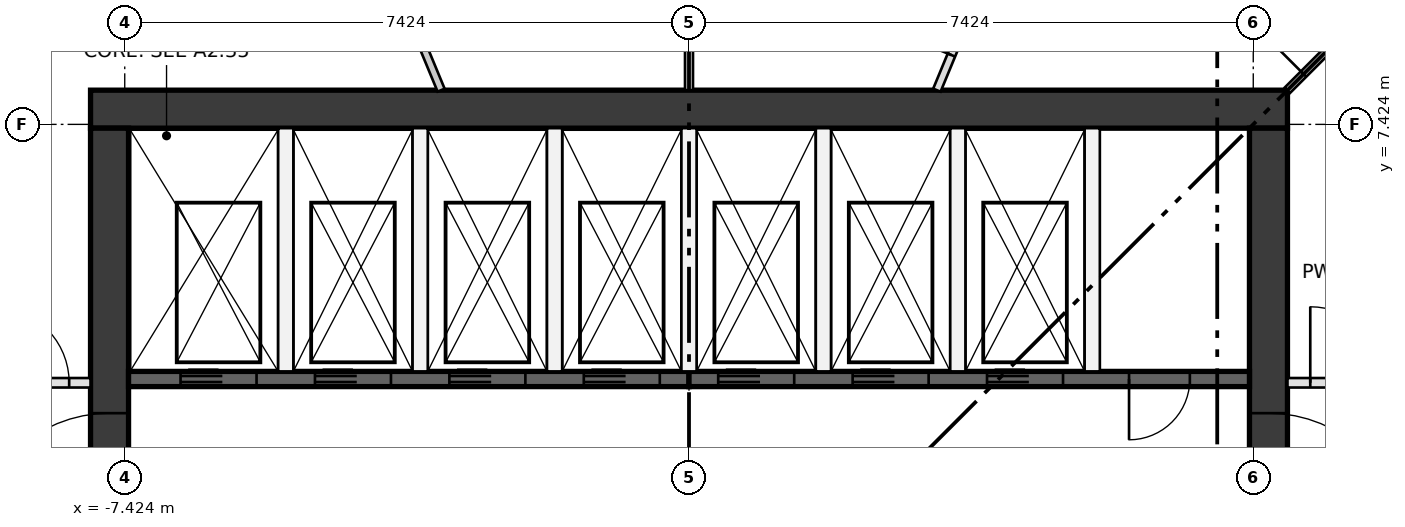
"""IFC4 building model, lengths in metres.
Left out: names, types, materials, properties, quantities, classifications, styles, units other than length and angle.
Written with IfcOpenShell. Run it as: python <this file> out.ifc"""

import sys

from ifc_helpers import new_model, si_unit, direction, frame, frame_2d, origin, place, context, subcontext, project, spatial, rectangle, extrude, element, fill, save


model = new_model("IFC4")
c1 = context("Model", 3, precision=1e-05, world=origin(), true_north=direction((0.0, 1.0)))
c2 = subcontext(c1, "Body", "Model", "MODEL_VIEW")
j1 = project(units=[si_unit("LENGTHUNIT", "METRE"), si_unit("PLANEANGLEUNIT", "RADIAN")], contexts=[c1])
p1 = place(None, origin())
s1 = spatial("IfcSite", under=j1, at=p1, CompositionType="ELEMENT")
p2 = place(p1, origin())
s2 = spatial("IfcBuilding", under=s1, at=p2, CompositionType="ELEMENT")
p3 = place(p2, frame((0.0, 0.0, 214.45)))
s3 = spatial("IfcBuildingStorey", under=s2, at=p3, CompositionType="ELEMENT", Elevation=214.45)
p4 = place(p3, frame((-7.874, 7.624, 0.0), z_axis=(0.0, 0.0, 1.0), x_axis=(1.0, 0.0, 0.0)))
e1 = element("IfcWall", 1, at=p4, inside=s3, PredefinedType="SHEAR", context=c2, shape_type="SweptSolid", body=[
    extrude(rectangle(XDim=15.748, YDim=0.5, at=frame_2d((7.874, 0.0))), origin(), (0.0, 0.0, 1.0), 3.35),
])
p5 = place(p3, frame((-7.624, -7.374, 0.0), z_axis=(0.0, 0.0, 1.0), x_axis=(0.0, 1.0, 0.0)))
e2 = element("IfcWall", 2, at=p5, inside=s3, PredefinedType="SHEAR", context=c2, shape_type="SweptSolid", body=[
    extrude(rectangle(XDim=14.748, YDim=0.5, at=frame_2d((7.374, 0.0))), origin(), (0.0, 0.0, 1.0), 3.35),
])
p6 = place(p5, frame((6.874, 0.0, 0.0)))
e3 = element("IfcOpeningElement", 3, at=p6, cuts=e2, PredefinedType="OPENING", context=c2, shape_type="SweptSolid", body=[
    extrude(rectangle(XDim=1.0, YDim=2.1, at=frame_2d((0.5, 1.05))), frame((0.0, 0.26, 0.0), z_axis=(0.0, -1.0, 0.0), x_axis=(1.0, 0.0, 0.0)), (0.0, 0.0, 1.0), 0.52),
])
p7 = place(p5, frame((3.75, 0.0, 0.0)))
e4 = element("IfcOpeningElement", 4, at=p7, cuts=e2, PredefinedType="OPENING", context=c2, shape_type="SweptSolid", body=[
    extrude(rectangle(XDim=1.8, YDim=2.1, at=frame_2d((0.9, 1.05))), frame((0.0, 0.26, 0.0), z_axis=(0.0, -1.0, 0.0), x_axis=(1.0, 0.0, 0.0)), (0.0, 0.0, 1.0), 0.52),
])
p8 = place(p5, frame((9.198, 0.0, 0.0)))
e5 = element("IfcOpeningElement", 5, at=p8, cuts=e2, PredefinedType="OPENING", context=c2, shape_type="SweptSolid", body=[
    extrude(rectangle(XDim=1.8, YDim=2.1, at=frame_2d((0.9, 1.05))), frame((0.0, 0.26, 0.0), z_axis=(0.0, -1.0, 0.0), x_axis=(1.0, 0.0, 0.0)), (0.0, 0.0, 1.0), 0.52),
])
p9 = place(p3, frame((7.624, -7.374, 0.0), z_axis=(0.0, 0.0, 1.0), x_axis=(0.0, 1.0, 0.0)))
e6 = element("IfcWall", 6, at=p9, inside=s3, PredefinedType="SHEAR", context=c2, shape_type="SweptSolid", body=[
    extrude(rectangle(XDim=14.748, YDim=0.5, at=frame_2d((7.374, 0.0))), origin(), (0.0, 0.0, 1.0), 3.35),
])
p10 = place(p9, frame((6.874, 0.0, 0.0)))
e7 = element("IfcOpeningElement", 7, at=p10, cuts=e6, PredefinedType="OPENING", context=c2, shape_type="SweptSolid", body=[
    extrude(rectangle(XDim=1.0, YDim=2.1, at=frame_2d((0.5, 1.05))), frame((0.0, 0.26, 0.0), z_axis=(0.0, -1.0, 0.0), x_axis=(1.0, 0.0, 0.0)), (0.0, 0.0, 1.0), 0.52),
])
p11 = place(p9, frame((3.75, 0.0, 0.0)))
e8 = element("IfcOpeningElement", 8, at=p11, cuts=e6, PredefinedType="OPENING", context=c2, shape_type="SweptSolid", body=[
    extrude(rectangle(XDim=1.8, YDim=2.1, at=frame_2d((0.9, 1.05))), frame((0.0, 0.26, 0.0), z_axis=(0.0, -1.0, 0.0), x_axis=(1.0, 0.0, 0.0)), (0.0, 0.0, 1.0), 0.52),
])
p12 = place(p9, frame((9.198, 0.0, 0.0)))
e9 = element("IfcOpeningElement", 9, at=p12, cuts=e6, PredefinedType="OPENING", context=c2, shape_type="SweptSolid", body=[
    extrude(rectangle(XDim=1.8, YDim=2.1, at=frame_2d((0.9, 1.05))), frame((0.0, 0.26, 0.0), z_axis=(0.0, -1.0, 0.0), x_axis=(1.0, 0.0, 0.0)), (0.0, 0.0, 1.0), 0.52),
])
p13 = place(p3, frame((-7.374, 4.074, 0.0), z_axis=(0.0, 0.0, 1.0), x_axis=(1.0, 0.0, 0.0)))
e10 = element("IfcWall", 10, at=p13, inside=s3, PredefinedType="SHEAR", context=c2, shape_type="SweptSolid", body=[
    extrude(rectangle(XDim=7.374, YDim=0.2, at=frame_2d((3.687, 0.0))), origin(), (0.0, 0.0, 1.0), 3.0),
])
p14 = place(p13, frame((0.684, 0.0, 0.0)))
e11 = element("IfcOpeningElement", 11, at=p14, cuts=e10, PredefinedType="OPENING", context=c2, shape_type="SweptSolid", body=[
    extrude(rectangle(XDim=1.0, YDim=2.1, at=frame_2d((0.5, 1.05))), frame((0.0, 0.11, 0.0), z_axis=(0.0, -1.0, 0.0), x_axis=(1.0, 0.0, 0.0)), (0.0, 0.0, 1.0), 0.22),
])
p15 = place(p13, frame((2.453, 0.0, 0.0)))
e12 = element("IfcOpeningElement", 12, at=p15, cuts=e10, PredefinedType="OPENING", context=c2, shape_type="SweptSolid", body=[
    extrude(rectangle(XDim=1.0, YDim=2.1, at=frame_2d((0.5, 1.05))), frame((0.0, 0.11, 0.0), z_axis=(0.0, -1.0, 0.0), x_axis=(1.0, 0.0, 0.0)), (0.0, 0.0, 1.0), 0.22),
])
p16 = place(p13, frame((4.221, 0.0, 0.0)))
e13 = element("IfcOpeningElement", 13, at=p16, cuts=e10, PredefinedType="OPENING", context=c2, shape_type="SweptSolid", body=[
    extrude(rectangle(XDim=1.0, YDim=2.1, at=frame_2d((0.5, 1.05))), frame((0.0, 0.11, 0.0), z_axis=(0.0, -1.0, 0.0), x_axis=(1.0, 0.0, 0.0)), (0.0, 0.0, 1.0), 0.22),
])
p17 = place(p13, frame((5.99, 0.0, 0.0)))
e14 = element("IfcOpeningElement", 14, at=p17, cuts=e10, PredefinedType="OPENING", context=c2, shape_type="SweptSolid", body=[
    extrude(rectangle(XDim=1.0, YDim=2.1, at=frame_2d((0.5, 1.05))), frame((0.0, 0.11, 0.0), z_axis=(0.0, -1.0, 0.0), x_axis=(1.0, 0.0, 0.0)), (0.0, 0.0, 1.0), 0.22),
])
p18 = place(p3, frame((0.0, 4.074, 0.0), z_axis=(0.0, 0.0, 1.0), x_axis=(1.0, 0.0, 0.0)))
e15 = element("IfcWall", 15, at=p18, inside=s3, PredefinedType="SHEAR", context=c2, shape_type="SweptSolid", body=[
    extrude(rectangle(XDim=7.374, YDim=0.2, at=frame_2d((3.687, 0.0))), origin(), (0.0, 0.0, 1.0), 3.0),
])
p19 = place(p18, frame((0.384, 0.0, 0.0)))
e16 = element("IfcOpeningElement", 16, at=p19, cuts=e15, PredefinedType="OPENING", context=c2, shape_type="SweptSolid", body=[
    extrude(rectangle(XDim=1.0, YDim=2.1, at=frame_2d((0.5, 1.05))), frame((0.0, 0.11, 0.0), z_axis=(0.0, -1.0, 0.0), x_axis=(1.0, 0.0, 0.0)), (0.0, 0.0, 1.0), 0.22),
])
p20 = place(p18, frame((2.153, 0.0, 0.0)))
e17 = element("IfcOpeningElement", 17, at=p20, cuts=e15, PredefinedType="OPENING", context=c2, shape_type="SweptSolid", body=[
    extrude(rectangle(XDim=1.0, YDim=2.1, at=frame_2d((0.5, 1.05))), frame((0.0, 0.11, 0.0), z_axis=(0.0, -1.0, 0.0), x_axis=(1.0, 0.0, 0.0)), (0.0, 0.0, 1.0), 0.22),
])
p21 = place(p18, frame((3.921, 0.0, 0.0)))
e18 = element("IfcOpeningElement", 18, at=p21, cuts=e15, PredefinedType="OPENING", context=c2, shape_type="SweptSolid", body=[
    extrude(rectangle(XDim=1.0, YDim=2.1, at=frame_2d((0.5, 1.05))), frame((0.0, 0.11, 0.0), z_axis=(0.0, -1.0, 0.0), x_axis=(1.0, 0.0, 0.0)), (0.0, 0.0, 1.0), 0.22),
])
p22 = place(p18, frame((5.79, 0.0, 0.0)))
e19 = element("IfcOpeningElement", 19, at=p22, cuts=e15, PredefinedType="OPENING", context=c2, shape_type="SweptSolid", body=[
    extrude(rectangle(XDim=0.8, YDim=2.1, at=frame_2d((0.4, 1.05))), frame((0.0, 0.11, 0.0), z_axis=(0.0, -1.0, 0.0), x_axis=(1.0, 0.0, 0.0)), (0.0, 0.0, 1.0), 0.22),
])
for number, where, z_axis, x_axis in (
    (20, (-5.305, 4.174, 0.0), (0.0, 0.0, 1.0), (0.0, 1.0, 0.0)),
    (21, (-3.537, 4.174, 0.0), (0.0, 0.0, 1.0), (0.0, 1.0, 0.0)),
    (22, (-1.769, 4.174, 0.0), (0.0, 0.0, 1.0), (0.0, 1.0, 0.0)),
    (23, (0.0, 4.174, 0.0), (0.0, 0.0, 1.0), (0.0, 1.0, 0.0)),
    (24, (1.769, 4.174, 0.0), (0.0, 0.0, 1.0), (0.0, 1.0, 0.0)),
    (25, (3.537, 4.174, 0.0), (0.0, 0.0, 1.0), (0.0, 1.0, 0.0)),
    (26, (5.305, 4.174, 0.0), (0.0, 0.0, 1.0), (0.0, 1.0, 0.0)),
):
    element("IfcWall", number, at=place(p3, frame(where, z_axis=z_axis, x_axis=x_axis)), inside=s3, PredefinedType="PARTITIONING", context=c2, shape_type="SweptSolid", body=[
        extrude(rectangle(XDim=3.2, YDim=0.2, at=frame_2d((1.6, 0.0))), origin(), (0.0, 0.0, 1.0), 3.0),
    ])
p23 = place(p3, frame((7.874, 4.024, 0.0), z_axis=(0.0, 0.0, 1.0), x_axis=(1.0, 0.0, 0.0)))
e27 = element("IfcWall", 27, at=p23, inside=s3, PredefinedType="PARTITIONING", context=c2, shape_type="SweptSolid", body=[
    extrude(rectangle(XDim=2.475, YDim=0.125, at=frame_2d((1.238, 0.0))), origin(), (0.0, 0.0, 1.0), 3.0),
])
p24 = place(p23, frame((0.3, 0.0, 0.0)))
e28 = element("IfcOpeningElement", 28, at=p24, cuts=e27, PredefinedType="OPENING", context=c2, shape_type="SweptSolid", body=[
    extrude(rectangle(XDim=1.0, YDim=2.1, at=frame_2d((0.5, 1.05))), frame((0.0, 0.073, 0.0), z_axis=(0.0, -1.0, 0.0), x_axis=(1.0, 0.0, 0.0)), (0.0, 0.0, 1.0), 0.145),
])
p25 = place(p3, frame((-9.436, 4.024, 0.0), z_axis=(0.0, 0.0, 1.0), x_axis=(1.0, 0.0, 0.0)))
e29 = element("IfcWall", 29, at=p25, inside=s3, PredefinedType="PARTITIONING", context=c2, shape_type="SweptSolid", body=[
    extrude(rectangle(XDim=1.562, YDim=0.125, at=frame_2d((0.781, 0.0))), origin(), (0.0, 0.0, 1.0), 3.0),
])
p26 = place(p25, frame((0.281, 0.0, 0.0)))
e30 = element("IfcOpeningElement", 30, at=p26, cuts=e29, PredefinedType="OPENING", context=c2, shape_type="SweptSolid", body=[
    extrude(rectangle(XDim=1.0, YDim=2.1, at=frame_2d((0.5, 1.05))), frame((0.0, 0.073, 0.0), z_axis=(0.0, -1.0, 0.0), x_axis=(1.0, 0.0, 0.0)), (0.0, 0.0, 1.0), 0.145),
])
p27 = place(p3, frame((7.874, 7.874, 0.0), z_axis=(0.0, 0.0, 1.0), x_axis=(0.707106781187, 0.707106781187, 0.0)))
e31 = element("IfcWall", 31, at=p27, inside=s3, PredefinedType="PARTITIONING", context=c2, shape_type="SweptSolid", body=[
    extrude(rectangle(XDim=3.584, YDim=0.1, at=frame_2d((1.792, 0.0))), origin(), (0.0, 0.0, 1.0), 3.0),
])
p28 = place(p27, frame((0.3, 0.0, 0.0)))
e32 = element("IfcOpeningElement", 32, at=p28, cuts=e31, PredefinedType="OPENING", context=c2, shape_type="SweptSolid", body=[
    extrude(rectangle(XDim=1.0, YDim=2.1, at=frame_2d((0.5, 1.05))), frame((0.0, 0.06, 0.0), z_axis=(0.0, -1.0, 0.0), x_axis=(1.0, 0.0, 0.0)), (0.0, 0.0, 1.0), 0.12),
])
p29 = place(p3, frame((3.261, 7.874, 0.0), z_axis=(0.0, 0.0, 1.0), x_axis=(0.382670108955, 0.923885051136, 0.0)))
e33 = element("IfcWall", 33, at=p29, inside=s3, PredefinedType="PARTITIONING", context=c2, shape_type="SweptSolid", body=[
    extrude(rectangle(XDim=2.077, YDim=0.105, at=frame_2d((1.039, 0.0))), origin(), (0.0, 0.0, 1.0), 3.0),
])
p30 = place(p29, frame((0.5, 0.0, 0.0)))
e34 = element("IfcOpeningElement", 34, at=p30, cuts=e33, PredefinedType="OPENING", context=c2, shape_type="SweptSolid", body=[
    extrude(rectangle(XDim=1.0, YDim=2.1, at=frame_2d((0.5, 1.05))), frame((0.0, 0.062, 0.0), z_axis=(0.0, -1.0, 0.0), x_axis=(1.0, 0.0, 0.0)), (0.0, 0.0, 1.0), 0.125),
])
p31 = place(p3, frame((0.0, 7.874, 0.0), z_axis=(0.0, 0.0, 1.0), x_axis=(0.0, 1.0, 0.0)))
e35 = element("IfcWall", 35, at=p31, inside=s3, PredefinedType="PARTITIONING", context=c2, shape_type="SweptSolid", body=[
    extrude(rectangle(XDim=2.726, YDim=0.105, at=frame_2d((1.363, 0.0))), origin(), (0.0, 0.0, 1.0), 3.0),
])
p32 = place(p3, frame((-4.056, 9.793, 0.0), z_axis=(0.0, 0.0, 1.0), x_axis=(0.382670108955, -0.923885051136, 0.0)))
e36 = element("IfcWall", 36, at=p32, inside=s3, PredefinedType="PARTITIONING", context=c2, shape_type="SweptSolid", body=[
    extrude(rectangle(XDim=2.077, YDim=0.1, at=frame_2d((1.039, 0.0))), origin(), (0.0, 0.0, 1.0), 3.0),
])
p33 = place(p32, frame((0.5, 0.0, 0.0)))
e37 = element("IfcOpeningElement", 37, at=p33, cuts=e36, PredefinedType="OPENING", context=c2, shape_type="SweptSolid", body=[
    extrude(rectangle(XDim=1.0, YDim=2.1, at=frame_2d((0.5, 1.05))), frame((0.0, 0.06, 0.0), z_axis=(0.0, -1.0, 0.0), x_axis=(1.0, 0.0, 0.0)), (0.0, 0.0, 1.0), 0.12),
])
p34 = place(p14, frame((1.0, 0.0, 0.0), z_axis=(0.0, 0.0, 1.0), x_axis=(-1.0, 0.0, 0.0)))
e38 = element("IfcDoor", 38, at=p34, inside=s3, OperationType="DOUBLE_DOOR_SLIDING", PredefinedType="DOOR", context=c2, shape_type="SweptSolid", body=[
    extrude(rectangle(XDim=1.0, YDim=2.1, at=frame_2d((0.5, 1.05))), frame((0.0, 0.025, 0.0), z_axis=(0.0, -1.0, 0.0), x_axis=(1.0, 0.0, 0.0)), (0.0, 0.0, 1.0), 0.05),
])
fill(e11, e38)
p35 = place(p15, frame((1.0, 0.0, 0.0), z_axis=(0.0, 0.0, 1.0), x_axis=(-1.0, 0.0, 0.0)))
e39 = element("IfcDoor", 39, at=p35, inside=s3, OperationType="DOUBLE_DOOR_SLIDING", PredefinedType="DOOR", context=c2, shape_type="SweptSolid", body=[
    extrude(rectangle(XDim=1.0, YDim=2.1, at=frame_2d((0.5, 1.05))), frame((0.0, 0.025, 0.0), z_axis=(0.0, -1.0, 0.0), x_axis=(1.0, 0.0, 0.0)), (0.0, 0.0, 1.0), 0.05),
])
fill(e12, e39)
p36 = place(p16, frame((1.0, 0.0, 0.0), z_axis=(0.0, 0.0, 1.0), x_axis=(-1.0, 0.0, 0.0)))
e40 = element("IfcDoor", 40, at=p36, inside=s3, OperationType="DOUBLE_DOOR_SLIDING", PredefinedType="DOOR", context=c2, shape_type="SweptSolid", body=[
    extrude(rectangle(XDim=1.0, YDim=2.1, at=frame_2d((0.5, 1.05))), frame((0.0, 0.025, 0.0), z_axis=(0.0, -1.0, 0.0), x_axis=(1.0, 0.0, 0.0)), (0.0, 0.0, 1.0), 0.05),
])
fill(e13, e40)
p37 = place(p17, frame((1.0, 0.0, 0.0), z_axis=(0.0, 0.0, 1.0), x_axis=(-1.0, 0.0, 0.0)))
e41 = element("IfcDoor", 41, at=p37, inside=s3, OperationType="DOUBLE_DOOR_SLIDING", PredefinedType="DOOR", context=c2, shape_type="SweptSolid", body=[
    extrude(rectangle(XDim=1.0, YDim=2.1, at=frame_2d((0.5, 1.05))), frame((0.0, 0.025, 0.0), z_axis=(0.0, -1.0, 0.0), x_axis=(1.0, 0.0, 0.0)), (0.0, 0.0, 1.0), 0.05),
])
fill(e14, e41)
p38 = place(p19, frame((1.0, 0.0, 0.0), z_axis=(0.0, 0.0, 1.0), x_axis=(-1.0, 0.0, 0.0)))
e42 = element("IfcDoor", 42, at=p38, inside=s3, OperationType="DOUBLE_DOOR_SLIDING", PredefinedType="DOOR", context=c2, shape_type="SweptSolid", body=[
    extrude(rectangle(XDim=1.0, YDim=2.1, at=frame_2d((0.5, 1.05))), frame((0.0, 0.025, 0.0), z_axis=(0.0, -1.0, 0.0), x_axis=(1.0, 0.0, 0.0)), (0.0, 0.0, 1.0), 0.05),
])
fill(e16, e42)
p39 = place(p20, frame((1.0, 0.0, 0.0), z_axis=(0.0, 0.0, 1.0), x_axis=(-1.0, 0.0, 0.0)))
e43 = element("IfcDoor", 43, at=p39, inside=s3, OperationType="DOUBLE_DOOR_SLIDING", PredefinedType="DOOR", context=c2, shape_type="SweptSolid", body=[
    extrude(rectangle(XDim=1.0, YDim=2.1, at=frame_2d((0.5, 1.05))), frame((0.0, 0.025, 0.0), z_axis=(0.0, -1.0, 0.0), x_axis=(1.0, 0.0, 0.0)), (0.0, 0.0, 1.0), 0.05),
])
fill(e17, e43)
p40 = place(p21, frame((1.0, 0.0, 0.0), z_axis=(0.0, 0.0, 1.0), x_axis=(-1.0, 0.0, 0.0)))
e44 = element("IfcDoor", 44, at=p40, inside=s3, OperationType="DOUBLE_DOOR_SLIDING", PredefinedType="DOOR", context=c2, shape_type="SweptSolid", body=[
    extrude(rectangle(XDim=1.0, YDim=2.1, at=frame_2d((0.5, 1.05))), frame((0.0, 0.025, 0.0), z_axis=(0.0, -1.0, 0.0), x_axis=(1.0, 0.0, 0.0)), (0.0, 0.0, 1.0), 0.05),
])
fill(e18, e44)
p41 = place(p22, frame((0.8, 0.0, 0.0), z_axis=(0.0, 0.0, 1.0), x_axis=(-1.0, 0.0, 0.0)))
e45 = element("IfcDoor", 45, at=p41, inside=s3, OperationType="SINGLE_SWING_LEFT", PredefinedType="DOOR", context=c2, shape_type="SweptSolid", body=[
    extrude(rectangle(XDim=0.8, YDim=2.1, at=frame_2d((0.4, 1.05))), frame((0.0, 0.025, 0.0), z_axis=(0.0, -1.0, 0.0), x_axis=(1.0, 0.0, 0.0)), (0.0, 0.0, 1.0), 0.05),
])
fill(e19, e45)
p42 = place(p8, origin())
e46 = element("IfcDoor", 46, at=p42, inside=s3, OperationType="DOUBLE_DOOR_SINGLE_SWING", PredefinedType="DOOR", context=c2, shape_type="SweptSolid", body=[
    extrude(rectangle(XDim=1.8, YDim=2.1, at=frame_2d((0.9, 1.05))), frame((0.0, 0.025, 0.0), z_axis=(0.0, -1.0, 0.0), x_axis=(1.0, 0.0, 0.0)), (0.0, 0.0, 1.0), 0.05),
])
fill(e5, e46)
p43 = place(p12, frame((1.8, 0.0, 0.0), z_axis=(0.0, 0.0, 1.0), x_axis=(-1.0, 0.0, 0.0)))
e47 = element("IfcDoor", 47, at=p43, inside=s3, OperationType="DOUBLE_DOOR_SINGLE_SWING", PredefinedType="DOOR", context=c2, shape_type="SweptSolid", body=[
    extrude(rectangle(XDim=1.8, YDim=2.1, at=frame_2d((0.9, 1.05))), frame((0.0, 0.025, 0.0), z_axis=(0.0, -1.0, 0.0), x_axis=(1.0, 0.0, 0.0)), (0.0, 0.0, 1.0), 0.05),
])
fill(e9, e47)
p44 = place(p24, origin())
e48 = element("IfcDoor", 48, at=p44, inside=s3, OperationType="SINGLE_SWING_LEFT", PredefinedType="DOOR", context=c2, shape_type="SweptSolid", body=[
    extrude(rectangle(XDim=1.0, YDim=2.1, at=frame_2d((0.5, 1.05))), frame((0.0, 0.025, 0.0), z_axis=(0.0, -1.0, 0.0), x_axis=(1.0, 0.0, 0.0)), (0.0, 0.0, 1.0), 0.05),
])
fill(e28, e48)
p45 = place(p26, origin())
e49 = element("IfcDoor", 49, at=p45, inside=s3, OperationType="SINGLE_SWING_LEFT", PredefinedType="DOOR", context=c2, shape_type="SweptSolid", body=[
    extrude(rectangle(XDim=1.0, YDim=2.1, at=frame_2d((0.5, 1.05))), frame((0.0, 0.025, 0.0), z_axis=(0.0, -1.0, 0.0), x_axis=(1.0, 0.0, 0.0)), (0.0, 0.0, 1.0), 0.05),
])
fill(e30, e49)
p46 = place(p28, origin())
e50 = element("IfcDoor", 50, at=p46, inside=s3, OperationType="SINGLE_SWING_LEFT", PredefinedType="DOOR", context=c2, shape_type="SweptSolid", body=[
    extrude(rectangle(XDim=1.0, YDim=2.1, at=frame_2d((0.5, 1.05))), frame((0.0, 0.025, 0.0), z_axis=(0.0, -1.0, 0.0), x_axis=(1.0, 0.0, 0.0)), (0.0, 0.0, 1.0), 0.05),
])
fill(e32, e50)
p47 = place(p30, origin())
e51 = element("IfcDoor", 51, at=p47, inside=s3, OperationType="SINGLE_SWING_LEFT", PredefinedType="DOOR", context=c2, shape_type="SweptSolid", body=[
    extrude(rectangle(XDim=1.0, YDim=2.1, at=frame_2d((0.5, 1.05))), frame((0.0, 0.025, 0.0), z_axis=(0.0, -1.0, 0.0), x_axis=(1.0, 0.0, 0.0)), (0.0, 0.0, 1.0), 0.05),
])
fill(e34, e51)
save(model, sys.argv[1])
